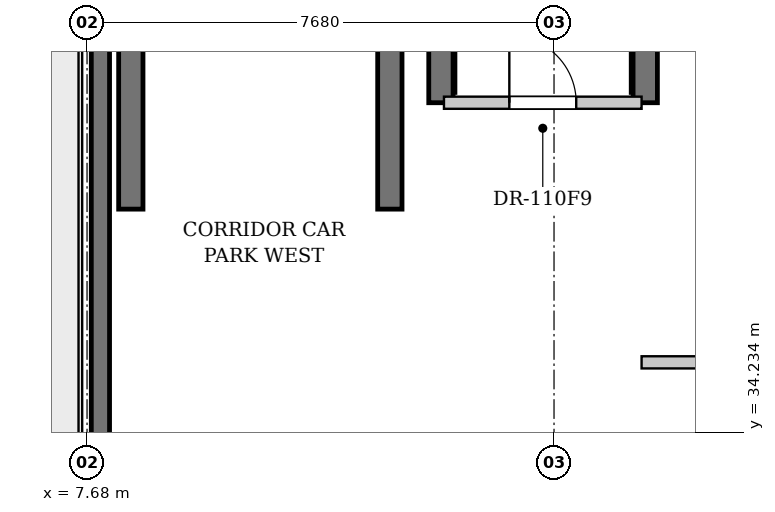
"""IFC4 building model, lengths in metres.
Left out: names, types, materials, properties, quantities, classifications, styles, units other than length and angle.
Written with IfcOpenShell. Run it as: python <this file> out.ifc"""

import sys

from ifc_helpers import new_model, si_unit, direction, frame, frame_2d, origin, place, context, subcontext, project, spatial, rectangle, extrude, element, fill, save


model = new_model("IFC4")
c1 = context("Model", 3, precision=1e-05, world=origin(), true_north=direction((0.0, 1.0)))
c2 = subcontext(c1, "Body", "Model", "MODEL_VIEW")
j1 = project(units=[si_unit("LENGTHUNIT", "METRE"), si_unit("PLANEANGLEUNIT", "RADIAN")], contexts=[c1])
p1 = place(None, origin())
s1 = spatial("IfcSite", under=j1, at=p1, CompositionType="ELEMENT")
p2 = place(p1, origin())
s2 = spatial("IfcBuilding", under=s1, at=p2, CompositionType="ELEMENT")
p3 = place(p2, frame((0.0, 0.0, -5.0)))
s3 = spatial("IfcBuildingStorey", under=s2, at=p3, CompositionType="ELEMENT", Elevation=-5.0)
p4 = place(p3, frame((7.9, 0.55, 0.0), z_axis=(0.0, 0.0, 1.0), x_axis=(0.0, 1.0, 0.0)))
e1 = element("IfcWall", 1, at=p4, inside=s3, PredefinedType="SHEAR", context=c2, shape_type="SweptSolid", body=[
    extrude(rectangle(XDim=49.3, YDim=0.3, at=frame_2d((24.65, 0.0))), origin(), (0.0, 0.0, 1.0), 4.65),
])
p5 = place(p4, frame((4.1, 0.0, 0.0)))
e2 = element("IfcOpeningElement", 2, at=p5, cuts=e1, PredefinedType="OPENING", context=c2, shape_type="SweptSolid", body=[
    extrude(rectangle(XDim=1.1, YDim=2.15, at=frame_2d((0.55, 1.075))), frame((0.0, 0.16, 0.0), z_axis=(0.0, -1.0, 0.0), x_axis=(1.0, 0.0, 0.0)), (0.0, 0.0, 1.0), 0.32),
])
for number, where, z_axis, x_axis in (
    (3, (8.4, 37.9, 0.0), (0.0, 0.0, 1.0), (0.0, 1.0, 0.0)),
    (4, (12.66, 37.9, 0.0), (0.0, 0.0, 1.0), (0.0, 1.0, 0.0)),
):
    element("IfcWall", number, at=place(p3, frame(where, z_axis=z_axis, x_axis=x_axis)), inside=s3, PredefinedType="SHEAR", context=c2, shape_type="SweptSolid", body=[
        extrude(rectangle(XDim=8.25, YDim=0.4, at=frame_2d((4.125, 0.0))), origin(), (0.0, 0.0, 1.0), 4.65),
    ])
for number, where, z_axis, x_axis in (
    (5, (13.5, 39.65, 0.0), (0.0, 0.0, 1.0), (0.0, 1.0, 0.0)),
    (6, (16.86, 39.65, 0.0), (0.0, 0.0, 1.0), (0.0, 1.0, 0.0)),
):
    element("IfcWall", number, at=place(p3, frame(where, z_axis=z_axis, x_axis=x_axis)), inside=s3, PredefinedType="SHEAR", context=c2, shape_type="SweptSolid", body=[
        extrude(rectangle(XDim=7.6, YDim=0.4, at=frame_2d((3.8, 0.0))), origin(), (0.0, 0.0, 1.0), 4.65),
    ])
p6 = place(p3, frame((13.55, 39.65, 0.0), z_axis=(0.0, 0.0, 1.0), x_axis=(1.0, 0.0, 0.0)))
e7 = element("IfcWall", 7, at=p6, inside=s3, PredefinedType="PARTITIONING", context=c2, shape_type="SweptSolid", body=[
    extrude(rectangle(XDim=3.25, YDim=0.2, at=frame_2d((1.625, 0.0))), origin(), (0.0, 0.0, 1.0), 4.65),
])
p7 = place(p6, frame((1.075, 0.0, 0.0)))
e8 = element("IfcOpeningElement", 8, at=p7, cuts=e7, PredefinedType="OPENING", context=c2, shape_type="SweptSolid", body=[
    extrude(rectangle(XDim=1.1, YDim=2.15, at=frame_2d((0.55, 1.075))), frame((0.0, 0.11, 0.0), z_axis=(0.0, -1.0, 0.0), x_axis=(1.0, 0.0, 0.0)), (0.0, 0.0, 1.0), 0.22),
])
p8 = place(p3, frame((16.8, 35.38, 0.0), z_axis=(0.0, 0.0, 1.0), x_axis=(1.0, 0.0, 0.0)))
e9 = element("IfcWall", 9, at=p8, inside=s3, PredefinedType="PARTITIONING", context=c2, shape_type="SweptSolid", body=[
    extrude(rectangle(XDim=5.95, YDim=0.2, at=frame_2d((2.975, 0.0))), origin(), (0.0, 0.0, 1.0), 4.65),
])
p9 = place(p8, frame((2.425, 0.0, 0.0)))
e10 = element("IfcOpeningElement", 10, at=p9, cuts=e9, PredefinedType="OPENING", context=c2, shape_type="SweptSolid", body=[
    extrude(rectangle(XDim=1.1, YDim=2.15, at=frame_2d((0.55, 1.075))), frame((0.0, 0.11, 0.0), z_axis=(0.0, -1.0, 0.0), x_axis=(1.0, 0.0, 0.0)), (0.0, 0.0, 1.0), 0.22),
])
p10 = place(p7, origin())
e11 = element("IfcDoor", 11, at=p10, inside=s3, OperationType="SINGLE_SWING_LEFT", PredefinedType="DOOR", context=c2, shape_type="SweptSolid", body=[
    extrude(rectangle(XDim=1.1, YDim=2.15, at=frame_2d((0.55, 1.075))), frame((0.0, 0.025, 0.0), z_axis=(0.0, -1.0, 0.0), x_axis=(1.0, 0.0, 0.0)), (0.0, 0.0, 1.0), 0.05),
])
fill(e8, e11)
save(model, sys.argv[1])
